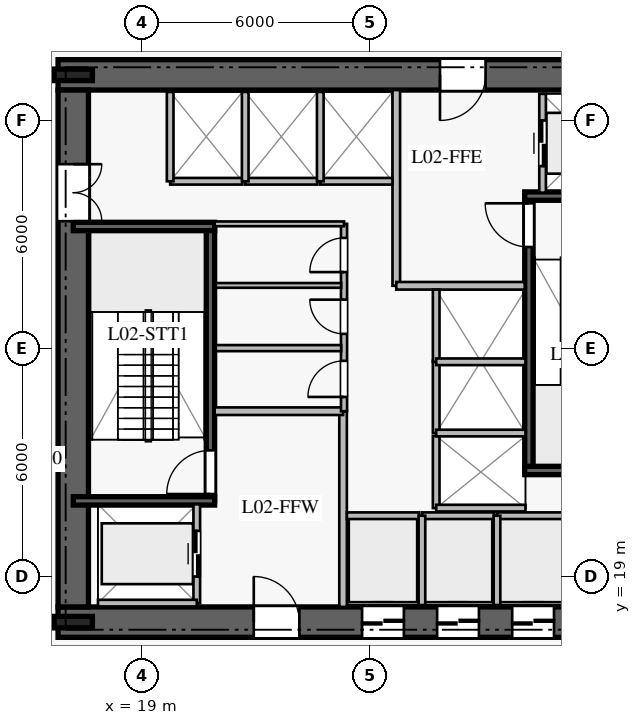
"""IFC4 building model, lengths in metres.
Left out: names, types, materials, properties, quantities, classifications, styles, units other than length and angle.
Written with IfcOpenShell. Run it as: python <this file> out.ifc"""

import sys

from ifc_helpers import new_model, si_unit, direction, frame, frame_2d, origin, origin_2d, place, context, subcontext, project, spatial, rectangle, i_section, extrude, element, fill, save


model = new_model("IFC4")
c1 = context("Model", 3, precision=1e-05, world=origin(), true_north=direction((0.0, 1.0)))
c2 = subcontext(c1, "Body", "Model", "MODEL_VIEW")
j1 = project(units=[si_unit("LENGTHUNIT", "METRE"), si_unit("PLANEANGLEUNIT", "RADIAN")], contexts=[c1])
p1 = place(None, origin())
s1 = spatial("IfcSite", under=j1, at=p1, CompositionType="ELEMENT")
p2 = place(p1, origin())
s2 = spatial("IfcBuilding", under=s1, at=p2, CompositionType="ELEMENT")
p3 = place(p2, frame((0.0, 0.0, 9.8)))
s3 = spatial("IfcBuildingStorey", under=s2, at=p3, CompositionType="ELEMENT", Elevation=9.8)
p4 = place(p3, frame((16.8, 17.8, 0.0), z_axis=(0.0, 0.0, 1.0), x_axis=(1.0, 0.0, 0.0)))
e1 = element("IfcWall", 1, at=p4, inside=s3, PredefinedType="SHEAR", context=c2, shape_type="SweptSolid", body=[
    extrude(rectangle(XDim=16.4, YDim=0.8, at=frame_2d((8.2, 0.0))), origin(), (0.0, 0.0, 1.0), 4.34),
])
p5 = place(p4, frame((5.15, 0.0, 0.0)))
e2 = element("IfcOpeningElement", 2, at=p5, cuts=e1, PredefinedType="OPENING", context=c2, shape_type="SweptSolid", body=[
    extrude(rectangle(XDim=1.2, YDim=2.25, at=frame_2d((0.6, 1.125))), frame((0.0, 0.41, 0.0), z_axis=(0.0, -1.0, 0.0), x_axis=(1.0, 0.0, 0.0)), (0.0, 0.0, 1.0), 0.82),
])
p6 = place(p4, frame((14.1, 0.0, 0.0)))
e3 = element("IfcOpeningElement", 3, at=p6, cuts=e1, PredefinedType="OPENING", context=c2, shape_type="SweptSolid", body=[
    extrude(rectangle(XDim=0.9, YDim=2.1, at=frame_2d((0.45, 1.05))), frame((0.0, 0.41, 0.0), z_axis=(0.0, -1.0, 0.0), x_axis=(1.0, 0.0, 0.0)), (0.0, 0.0, 1.0), 0.82),
])
p7 = place(p4, frame((8.0, 0.0, 0.0)))
e4 = element("IfcOpeningElement", 4, at=p7, cuts=e1, PredefinedType="OPENING", context=c2, shape_type="SweptSolid", body=[
    extrude(rectangle(XDim=1.1, YDim=2.2, at=frame_2d((0.55, 1.1))), frame((0.0, 0.41, 0.0), z_axis=(0.0, -1.0, 0.0), x_axis=(1.0, 0.0, 0.0)), (0.0, 0.0, 1.0), 0.82),
])
p8 = place(p4, frame((9.975, 0.0, 0.0)))
e5 = element("IfcOpeningElement", 5, at=p8, cuts=e1, PredefinedType="OPENING", context=c2, shape_type="SweptSolid", body=[
    extrude(rectangle(XDim=1.1, YDim=2.2, at=frame_2d((0.55, 1.1))), frame((0.0, 0.41, 0.0), z_axis=(0.0, -1.0, 0.0), x_axis=(1.0, 0.0, 0.0)), (0.0, 0.0, 1.0), 0.82),
])
p9 = place(p4, frame((11.95, 0.0, 0.0)))
e6 = element("IfcOpeningElement", 6, at=p9, cuts=e1, PredefinedType="OPENING", context=c2, shape_type="SweptSolid", body=[
    extrude(rectangle(XDim=1.1, YDim=2.2, at=frame_2d((0.55, 1.1))), frame((0.0, 0.41, 0.0), z_axis=(0.0, -1.0, 0.0), x_axis=(1.0, 0.0, 0.0)), (0.0, 0.0, 1.0), 0.82),
])
p10 = place(p3, frame((33.2, 32.2, 0.0), z_axis=(0.0, 0.0, 1.0), x_axis=(-1.0, 0.0, 0.0)))
e7 = element("IfcWall", 7, at=p10, inside=s3, PredefinedType="SHEAR", context=c2, shape_type="SweptSolid", body=[
    extrude(rectangle(XDim=16.4, YDim=0.8, at=frame_2d((8.2, 0.0))), origin(), (0.0, 0.0, 1.0), 4.34),
])
p11 = place(p10, frame((5.15, 0.0, 0.0)))
e8 = element("IfcOpeningElement", 8, at=p11, cuts=e7, PredefinedType="OPENING", context=c2, shape_type="SweptSolid", body=[
    extrude(rectangle(XDim=1.2, YDim=2.25, at=frame_2d((0.6, 1.125))), frame((0.0, 0.41, 0.0), z_axis=(0.0, -1.0, 0.0), x_axis=(1.0, 0.0, 0.0)), (0.0, 0.0, 1.0), 0.82),
])
p12 = place(p3, frame((17.2, 31.8, 0.0), z_axis=(0.0, 0.0, 1.0), x_axis=(0.0, -1.0, 0.0)))
e9 = element("IfcWall", 9, at=p12, inside=s3, PredefinedType="SHEAR", context=c2, shape_type="SweptSolid", body=[
    extrude(rectangle(XDim=13.6, YDim=0.8, at=frame_2d((6.8, 0.0))), origin(), (0.0, 0.0, 1.0), 4.34),
])
p13 = place(p12, frame((1.95, 0.0, 0.0)))
e10 = element("IfcOpeningElement", 10, at=p13, cuts=e9, PredefinedType="OPENING", context=c2, shape_type="SweptSolid", body=[
    extrude(rectangle(XDim=1.5, YDim=2.2, at=frame_2d((0.75, 1.1))), frame((0.0, 0.41, 0.0), z_axis=(0.0, -1.0, 0.0), x_axis=(1.0, 0.0, 0.0)), (0.0, 0.0, 1.0), 0.82),
])
for number, where, z_axis, x_axis in (
    (11, (17.2, 17.8, 0.0), (0.0, 0.0, 1.0), (1.0, 0.0, 0.0)),
    (12, (17.2, 32.2, 0.0), (0.0, 0.0, 1.0), (1.0, 0.0, 0.0)),
):
    element("IfcColumn", number, at=place(p3, frame(where, z_axis=z_axis, x_axis=x_axis)), inside=s3, PredefinedType="COLUMN", context=c2, shape_type="SweptSolid", body=[
        extrude(i_section(OverallWidth=0.302, OverallDepth=1.008, WebThickness=0.021, FlangeThickness=0.04, at=origin_2d()), origin(), (0.0, 0.0, 1.0), 4.6),
    ])
p14 = place(p3, frame((20.81, 20.99, 0.0), z_axis=(0.0, 0.0, 1.0), x_axis=(0.0, 1.0, 0.0)))
e13 = element("IfcWall", 13, at=p14, inside=s3, PredefinedType="SOLIDWALL", context=c2, shape_type="SweptSolid", body=[
    extrude(rectangle(XDim=7.22, YDim=0.22, at=frame_2d((3.61, 0.0))), origin(), (0.0, 0.0, 1.0), 4.34),
])
p15 = place(p14, frame((0.18, 0.0, 0.0)))
e14 = element("IfcOpeningElement", 14, at=p15, cuts=e13, PredefinedType="OPENING", context=c2, shape_type="SweptSolid", body=[
    extrude(rectangle(XDim=1.15, YDim=2.2, at=frame_2d((0.575, 1.1))), frame((0.0, 0.12, 0.0), z_axis=(0.0, -1.0, 0.0), x_axis=(1.0, 0.0, 0.0)), (0.0, 0.0, 1.0), 0.24),
])
for number, where, z_axis, x_axis in (
    (15, (17.2, 20.99, 0.0), (0.0, 0.0, 1.0), (1.0, 0.0, 0.0)),
    (16, (17.2, 28.21, 0.0), (0.0, 0.0, 1.0), (1.0, 0.0, 0.0)),
):
    element("IfcWall", number, at=place(p3, frame(where, z_axis=z_axis, x_axis=x_axis)), inside=s3, PredefinedType="SOLIDWALL", context=c2, shape_type="SweptSolid", body=[
        extrude(rectangle(XDim=3.72, YDim=0.22, at=frame_2d((1.86, 0.0))), origin(), (0.0, 0.0, 1.0), 4.34),
    ])
p16 = place(p3, frame((29.19, 21.79, 0.0), z_axis=(0.0, 0.0, 1.0), x_axis=(0.0, 1.0, 0.0)))
e17 = element("IfcWall", 17, at=p16, inside=s3, PredefinedType="SOLIDWALL", context=c2, shape_type="SweptSolid", body=[
    extrude(rectangle(XDim=7.22, YDim=0.22, at=frame_2d((3.61, 0.0))), origin(), (0.0, 0.0, 1.0), 4.34),
])
p17 = place(p16, frame((5.88, 0.0, 0.0)))
e18 = element("IfcOpeningElement", 18, at=p17, cuts=e17, PredefinedType="OPENING", context=c2, shape_type="SweptSolid", body=[
    extrude(rectangle(XDim=1.15, YDim=2.2, at=frame_2d((0.575, 1.1))), frame((0.0, 0.12, 0.0), z_axis=(0.0, -1.0, 0.0), x_axis=(1.0, 0.0, 0.0)), (0.0, 0.0, 1.0), 0.24),
])
for number, where, z_axis, x_axis in (
    (19, (29.08, 21.79, 0.0), (0.0, 0.0, 1.0), (1.0, 0.0, 0.0)),
    (20, (29.08, 29.01, 0.0), (0.0, 0.0, 1.0), (1.0, 0.0, 0.0)),
):
    element("IfcWall", number, at=place(p3, frame(where, z_axis=z_axis, x_axis=x_axis)), inside=s3, PredefinedType="SOLIDWALL", context=c2, shape_type="SweptSolid", body=[
        extrude(rectangle(XDim=3.72, YDim=0.22, at=frame_2d((1.86, 0.0))), origin(), (0.0, 0.0, 1.0), 4.34),
    ])
p18 = place(p3, frame((24.3, 18.2, 0.0), z_axis=(0.0, 0.0, 1.0), x_axis=(0.0, 1.0, 0.0)))
e21 = element("IfcWall", 21, at=p18, inside=s3, PredefinedType="PARTITIONING", context=c2, shape_type="SweptSolid", body=[
    extrude(rectangle(XDim=5.15, YDim=0.2, at=frame_2d((2.575, 0.0))), origin(), (0.0, 0.0, 1.0), 4.34),
])
p19 = place(p3, frame((20.92, 23.35, 0.0), z_axis=(0.0, 0.0, 1.0), x_axis=(1.0, 0.0, 0.0)))
e22 = element("IfcWall", 22, at=p19, inside=s3, PredefinedType="PARTITIONING", context=c2, shape_type="SweptSolid", body=[
    extrude(rectangle(XDim=3.38, YDim=0.2, at=frame_2d((1.69, 0.0))), origin(), (0.0, 0.0, 1.0), 4.34),
])
p20 = place(p3, frame((25.7, 26.65, 0.0), z_axis=(0.0, 0.0, 1.0), x_axis=(0.0, 1.0, 0.0)))
e23 = element("IfcWall", 23, at=p20, inside=s3, PredefinedType="PARTITIONING", context=c2, shape_type="SweptSolid", body=[
    extrude(rectangle(XDim=5.15, YDim=0.2, at=frame_2d((2.575, 0.0))), origin(), (0.0, 0.0, 1.0), 4.34),
])
p21 = place(p3, frame((25.7, 26.65, 0.0), z_axis=(0.0, 0.0, 1.0), x_axis=(1.0, 0.0, 0.0)))
e24 = element("IfcWall", 24, at=p21, inside=s3, PredefinedType="PARTITIONING", context=c2, shape_type="SweptSolid", body=[
    extrude(rectangle(XDim=3.38, YDim=0.2, at=frame_2d((1.69, 0.0))), origin(), (0.0, 0.0, 1.0), 4.34),
])
p22 = place(p3, frame((24.325, 23.35, 0.0), z_axis=(0.0, 0.0, 1.0), x_axis=(0.0, 1.0, 0.0)))
e25 = element("IfcWall", 25, at=p22, inside=s3, PredefinedType="PLUMBINGWALL", context=c2, shape_type="SweptSolid", body=[
    extrude(rectangle(XDim=4.93, YDim=0.16, at=frame_2d((2.465, 0.0))), origin(), (0.0, 0.0, 1.0), 4.34),
])
p23 = place(p22, frame((0.375, 0.0, 0.0)))
e26 = element("IfcOpeningElement", 26, at=p23, cuts=e25, PredefinedType="OPENING", context=c2, shape_type="SweptSolid", body=[
    extrude(rectangle(XDim=0.95, YDim=2.1, at=frame_2d((0.475, 1.05))), frame((0.0, 0.09, 0.0), z_axis=(0.0, -1.0, 0.0), x_axis=(1.0, 0.0, 0.0)), (0.0, 0.0, 1.0), 0.18),
])
p24 = place(p22, frame((2.035, 0.0, 0.0)))
e27 = element("IfcOpeningElement", 27, at=p24, cuts=e25, PredefinedType="OPENING", context=c2, shape_type="SweptSolid", body=[
    extrude(rectangle(XDim=0.9, YDim=2.1, at=frame_2d((0.45, 1.05))), frame((0.0, 0.09, 0.0), z_axis=(0.0, -1.0, 0.0), x_axis=(1.0, 0.0, 0.0)), (0.0, 0.0, 1.0), 0.18),
])
p25 = place(p22, frame((3.66, 0.0, 0.0)))
e28 = element("IfcOpeningElement", 28, at=p25, cuts=e25, PredefinedType="OPENING", context=c2, shape_type="SweptSolid", body=[
    extrude(rectangle(XDim=0.9, YDim=2.1, at=frame_2d((0.45, 1.05))), frame((0.0, 0.09, 0.0), z_axis=(0.0, -1.0, 0.0), x_axis=(1.0, 0.0, 0.0)), (0.0, 0.0, 1.0), 0.18),
])
p26 = place(p3, frame((20.92, 28.28, 0.0), z_axis=(0.0, 0.0, 1.0), x_axis=(1.0, 0.0, 0.0)))
e29 = element("IfcWall", 29, at=p26, inside=s3, PredefinedType="PARTITIONING", context=c2, shape_type="SweptSolid", body=[
    extrude(rectangle(XDim=3.405, YDim=0.125, at=frame_2d((1.703, 0.0))), origin(), (0.0, 0.0, 1.0), 4.34),
])
p27 = place(p3, frame((20.95, 25.01, 0.0), z_axis=(0.0, 0.0, 1.0), x_axis=(1.0, 0.0, 0.0)))
e30 = element("IfcWall", 30, at=p27, inside=s3, PredefinedType="PLUMBINGWALL", context=c2, shape_type="SweptSolid", body=[
    extrude(rectangle(XDim=3.3, YDim=0.16, at=frame_2d((1.65, 0.0))), origin(), (0.0, 0.0, 1.0), 4.34),
])
p28 = place(p3, frame((20.95, 26.66, 0.0), z_axis=(0.0, 0.0, 1.0), x_axis=(1.0, 0.0, 0.0)))
e31 = element("IfcWall", 31, at=p28, inside=s3, PredefinedType="PARTITIONING", context=c2, shape_type="SweptSolid", body=[
    extrude(rectangle(XDim=3.3, YDim=0.125, at=frame_2d((1.65, 0.0))), origin(), (0.0, 0.0, 1.0), 4.34),
])
p29 = place(p3, frame((24.4, 20.6, 0.0), z_axis=(0.0, 0.0, 1.0), x_axis=(1.0, 0.0, 0.0)))
e32 = element("IfcWall", 32, at=p29, inside=s3, PredefinedType="PARTITIONING", context=c2, shape_type="SweptSolid", body=[
    extrude(rectangle(XDim=1.9, YDim=0.175, at=frame_2d((0.95, 0.0))), origin(), (0.0, 0.0, 1.0), 4.34),
])
p30 = place(p3, frame((26.375, 20.6, 0.0), z_axis=(0.0, 0.0, 1.0), x_axis=(1.0, 0.0, 0.0)))
e33 = element("IfcWall", 33, at=p30, inside=s3, PredefinedType="PARTITIONING", context=c2, shape_type="SweptSolid", body=[
    extrude(rectangle(XDim=1.9, YDim=0.175, at=frame_2d((0.95, 0.0))), origin(), (0.0, 0.0, 1.0), 4.34),
])
p31 = place(p3, frame((26.375, 18.25, 0.0), z_axis=(0.0, 0.0, 1.0), x_axis=(0.0, 1.0, 0.0)))
e34 = element("IfcWall", 34, at=p31, inside=s3, PredefinedType="PARTITIONING", context=c2, shape_type="SweptSolid", body=[
    extrude(rectangle(XDim=2.35, YDim=0.175, at=frame_2d((1.175, 0.0))), origin(), (0.0, 0.0, 1.0), 4.34),
])
p32 = place(p3, frame((28.35, 20.6, 0.0), z_axis=(0.0, 0.0, 1.0), x_axis=(1.0, 0.0, 0.0)))
e35 = element("IfcWall", 35, at=p32, inside=s3, PredefinedType="PARTITIONING", context=c2, shape_type="SweptSolid", body=[
    extrude(rectangle(XDim=1.9, YDim=0.175, at=frame_2d((0.95, 0.0))), origin(), (0.0, 0.0, 1.0), 4.34),
])
p33 = place(p3, frame((28.35, 18.25, 0.0), z_axis=(0.0, 0.0, 1.0), x_axis=(0.0, 1.0, 0.0)))
e36 = element("IfcWall", 36, at=p33, inside=s3, PredefinedType="PARTITIONING", context=c2, shape_type="SweptSolid", body=[
    extrude(rectangle(XDim=2.35, YDim=0.175, at=frame_2d((1.175, 0.0))), origin(), (0.0, 0.0, 1.0), 4.34),
])
p34 = place(p3, frame((19.75, 29.4, 0.0), z_axis=(0.0, 0.0, 1.0), x_axis=(1.0, 0.0, 0.0)))
e37 = element("IfcWall", 37, at=p34, inside=s3, PredefinedType="PARTITIONING", context=c2, shape_type="SweptSolid", body=[
    extrude(rectangle(XDim=1.9, YDim=0.175, at=frame_2d((0.95, 0.0))), origin(), (0.0, 0.0, 1.0), 4.34),
])
p35 = place(p3, frame((19.75, 29.4, 0.0), z_axis=(0.0, 0.0, 1.0), x_axis=(0.0, 1.0, 0.0)))
e38 = element("IfcWall", 38, at=p35, inside=s3, PredefinedType="PARTITIONING", context=c2, shape_type="SweptSolid", body=[
    extrude(rectangle(XDim=2.35, YDim=0.175, at=frame_2d((1.175, 0.0))), origin(), (0.0, 0.0, 1.0), 4.34),
])
p36 = place(p3, frame((21.725, 29.4, 0.0), z_axis=(0.0, 0.0, 1.0), x_axis=(1.0, 0.0, 0.0)))
e39 = element("IfcWall", 39, at=p36, inside=s3, PredefinedType="PARTITIONING", context=c2, shape_type="SweptSolid", body=[
    extrude(rectangle(XDim=1.9, YDim=0.175, at=frame_2d((0.95, 0.0))), origin(), (0.0, 0.0, 1.0), 4.34),
])
p37 = place(p3, frame((21.725, 29.4, 0.0), z_axis=(0.0, 0.0, 1.0), x_axis=(0.0, 1.0, 0.0)))
e40 = element("IfcWall", 40, at=p37, inside=s3, PredefinedType="PARTITIONING", context=c2, shape_type="SweptSolid", body=[
    extrude(rectangle(XDim=2.35, YDim=0.175, at=frame_2d((1.175, 0.0))), origin(), (0.0, 0.0, 1.0), 4.34),
])
p38 = place(p3, frame((23.7, 29.4, 0.0), z_axis=(0.0, 0.0, 1.0), x_axis=(1.0, 0.0, 0.0)))
e41 = element("IfcWall", 41, at=p38, inside=s3, PredefinedType="PARTITIONING", context=c2, shape_type="SweptSolid", body=[
    extrude(rectangle(XDim=1.9, YDim=0.175, at=frame_2d((0.95, 0.0))), origin(), (0.0, 0.0, 1.0), 4.34),
])
p39 = place(p3, frame((23.7, 29.4, 0.0), z_axis=(0.0, 0.0, 1.0), x_axis=(0.0, 1.0, 0.0)))
e42 = element("IfcWall", 42, at=p39, inside=s3, PredefinedType="PARTITIONING", context=c2, shape_type="SweptSolid", body=[
    extrude(rectangle(XDim=2.35, YDim=0.175, at=frame_2d((1.175, 0.0))), origin(), (0.0, 0.0, 1.0), 4.34),
])
p40 = place(p3, frame((26.75, 20.8, 0.0), z_axis=(0.0, 0.0, 1.0), x_axis=(0.0, 1.0, 0.0)))
e43 = element("IfcWall", 43, at=p40, inside=s3, PredefinedType="PARTITIONING", context=c2, shape_type="SweptSolid", body=[
    extrude(rectangle(XDim=1.9, YDim=0.175, at=frame_2d((0.95, 0.0))), origin(), (0.0, 0.0, 1.0), 4.34),
])
p41 = place(p3, frame((26.75, 20.8, 0.0), z_axis=(0.0, 0.0, 1.0), x_axis=(1.0, 0.0, 0.0)))
e44 = element("IfcWall", 44, at=p41, inside=s3, PredefinedType="PARTITIONING", context=c2, shape_type="SweptSolid", body=[
    extrude(rectangle(XDim=2.35, YDim=0.175, at=frame_2d((1.175, 0.0))), origin(), (0.0, 0.0, 1.0), 4.34),
])
p42 = place(p3, frame((26.75, 22.775, 0.0), z_axis=(0.0, 0.0, 1.0), x_axis=(0.0, 1.0, 0.0)))
e45 = element("IfcWall", 45, at=p42, inside=s3, PredefinedType="PARTITIONING", context=c2, shape_type="SweptSolid", body=[
    extrude(rectangle(XDim=1.9, YDim=0.175, at=frame_2d((0.95, 0.0))), origin(), (0.0, 0.0, 1.0), 4.34),
])
p43 = place(p3, frame((26.75, 22.775, 0.0), z_axis=(0.0, 0.0, 1.0), x_axis=(1.0, 0.0, 0.0)))
e46 = element("IfcWall", 46, at=p43, inside=s3, PredefinedType="PARTITIONING", context=c2, shape_type="SweptSolid", body=[
    extrude(rectangle(XDim=2.35, YDim=0.175, at=frame_2d((1.175, 0.0))), origin(), (0.0, 0.0, 1.0), 4.34),
])
p44 = place(p3, frame((26.75, 24.65, 0.0), z_axis=(0.0, 0.0, 1.0), x_axis=(0.0, 1.0, 0.0)))
e47 = element("IfcWall", 47, at=p44, inside=s3, PredefinedType="PARTITIONING", context=c2, shape_type="SweptSolid", body=[
    extrude(rectangle(XDim=1.9, YDim=0.175, at=frame_2d((0.95, 0.0))), origin(), (0.0, 0.0, 1.0), 4.34),
])
p45 = place(p3, frame((26.75, 24.65, 0.0), z_axis=(0.0, 0.0, 1.0), x_axis=(1.0, 0.0, 0.0)))
e48 = element("IfcWall", 48, at=p45, inside=s3, PredefinedType="PARTITIONING", context=c2, shape_type="SweptSolid", body=[
    extrude(rectangle(XDim=2.35, YDim=0.175, at=frame_2d((1.175, 0.0))), origin(), (0.0, 0.0, 1.0), 4.34),
])
p46 = place(p3, frame((20.45, 18.3, 0.0), z_axis=(0.0, 0.0, 1.0), x_axis=(0.0, 1.0, 0.0)))
e49 = element("IfcWall", 49, at=p46, inside=s3, PredefinedType="PARTITIONING", context=c2, shape_type="SweptSolid", body=[
    extrude(rectangle(XDim=2.6, YDim=0.175, at=frame_2d((1.3, 0.0))), origin(), (0.0, 0.0, 1.0), 4.34),
])
p47 = place(p46, frame((0.7, 0.0, 0.0)))
e50 = element("IfcOpeningElement", 50, at=p47, cuts=e49, PredefinedType="OPENING", context=c2, shape_type="SweptSolid", body=[
    extrude(rectangle(XDim=1.2, YDim=2.2, at=frame_2d((0.6, 1.1))), frame((0.0, 0.098, 0.0), z_axis=(0.0, -1.0, 0.0), x_axis=(1.0, 0.0, 0.0)), (0.0, 0.0, 1.0), 0.195),
])
p48 = place(p3, frame((17.85, 18.3, 0.0), z_axis=(0.0, 0.0, 1.0), x_axis=(1.0, 0.0, 0.0)))
e51 = element("IfcWall", 51, at=p48, inside=s3, PredefinedType="PARTITIONING", context=c2, shape_type="SweptSolid", body=[
    extrude(rectangle(XDim=2.6, YDim=0.175, at=frame_2d((1.3, 0.0))), origin(), (0.0, 0.0, 1.0), 4.34),
])
p49 = place(p3, frame((29.55, 29.1, 0.0), z_axis=(0.0, 0.0, 1.0), x_axis=(0.0, 1.0, 0.0)))
e52 = element("IfcWall", 52, at=p49, inside=s3, PredefinedType="PARTITIONING", context=c2, shape_type="SweptSolid", body=[
    extrude(rectangle(XDim=2.6, YDim=0.175, at=frame_2d((1.3, 0.0))), origin(), (0.0, 0.0, 1.0), 4.34),
])
p50 = place(p49, frame((0.7, 0.0, 0.0)))
e53 = element("IfcOpeningElement", 53, at=p50, cuts=e52, PredefinedType="OPENING", context=c2, shape_type="SweptSolid", body=[
    extrude(rectangle(XDim=1.2, YDim=2.2, at=frame_2d((0.6, 1.1))), frame((0.0, 0.098, 0.0), z_axis=(0.0, -1.0, 0.0), x_axis=(1.0, 0.0, 0.0)), (0.0, 0.0, 1.0), 0.195),
])
p51 = place(p15, origin())
e54 = element("IfcDoor", 54, at=p51, inside=s3, OperationType="SINGLE_SWING_LEFT", PredefinedType="DOOR", context=c2, shape_type="SweptSolid", body=[
    extrude(rectangle(XDim=1.15, YDim=2.2, at=frame_2d((0.575, 1.1))), frame((0.0, 0.025, 0.0), z_axis=(0.0, -1.0, 0.0), x_axis=(1.0, 0.0, 0.0)), (0.0, 0.0, 1.0), 0.05),
])
fill(e14, e54)
p52 = place(p17, origin())
e55 = element("IfcDoor", 55, at=p52, inside=s3, OperationType="SINGLE_SWING_RIGHT", PredefinedType="DOOR", context=c2, shape_type="SweptSolid", body=[
    extrude(rectangle(XDim=1.15, YDim=2.2, at=frame_2d((0.575, 1.1))), frame((0.0, 0.025, 0.0), z_axis=(0.0, -1.0, 0.0), x_axis=(1.0, 0.0, 0.0)), (0.0, 0.0, 1.0), 0.05),
])
fill(e18, e55)
p53 = place(p5, origin())
e56 = element("IfcDoor", 56, at=p53, inside=s3, OperationType="SINGLE_SWING_LEFT", PredefinedType="DOOR", context=c2, shape_type="SweptSolid", body=[
    extrude(rectangle(XDim=1.2, YDim=2.25, at=frame_2d((0.6, 1.125))), frame((0.0, 0.025, 0.0), z_axis=(0.0, -1.0, 0.0), x_axis=(1.0, 0.0, 0.0)), (0.0, 0.0, 1.0), 0.05),
])
fill(e2, e56)
p54 = place(p11, origin())
e57 = element("IfcDoor", 57, at=p54, inside=s3, OperationType="SINGLE_SWING_RIGHT", PredefinedType="DOOR", context=c2, shape_type="SweptSolid", body=[
    extrude(rectangle(XDim=1.2, YDim=2.25, at=frame_2d((0.6, 1.125))), frame((0.0, 0.025, 0.0), z_axis=(0.0, -1.0, 0.0), x_axis=(1.0, 0.0, 0.0)), (0.0, 0.0, 1.0), 0.05),
])
fill(e8, e57)
p55 = place(p13, origin())
e58 = element("IfcDoor", 58, at=p55, inside=s3, OperationType="DOUBLE_DOOR_SINGLE_SWING", PredefinedType="DOOR", context=c2, shape_type="SweptSolid", body=[
    extrude(rectangle(XDim=1.5, YDim=2.2, at=frame_2d((0.75, 1.1))), frame((0.0, 0.025, 0.0), z_axis=(0.0, -1.0, 0.0), x_axis=(1.0, 0.0, 0.0)), (0.0, 0.0, 1.0), 0.05),
])
fill(e10, e58)
p56 = place(p23, origin())
e59 = element("IfcDoor", 59, at=p56, inside=s3, OperationType="SINGLE_SWING_LEFT", PredefinedType="DOOR", context=c2, shape_type="SweptSolid", body=[
    extrude(rectangle(XDim=0.95, YDim=2.1, at=frame_2d((0.475, 1.05))), frame((0.0, 0.025, 0.0), z_axis=(0.0, -1.0, 0.0), x_axis=(1.0, 0.0, 0.0)), (0.0, 0.0, 1.0), 0.05),
])
fill(e26, e59)
p57 = place(p24, origin())
e60 = element("IfcDoor", 60, at=p57, inside=s3, OperationType="SINGLE_SWING_RIGHT", PredefinedType="DOOR", context=c2, shape_type="SweptSolid", body=[
    extrude(rectangle(XDim=0.9, YDim=2.1, at=frame_2d((0.45, 1.05))), frame((0.0, 0.025, 0.0), z_axis=(0.0, -1.0, 0.0), x_axis=(1.0, 0.0, 0.0)), (0.0, 0.0, 1.0), 0.05),
])
fill(e27, e60)
p58 = place(p25, origin())
e61 = element("IfcDoor", 61, at=p58, inside=s3, OperationType="SINGLE_SWING_LEFT", PredefinedType="DOOR", context=c2, shape_type="SweptSolid", body=[
    extrude(rectangle(XDim=0.9, YDim=2.1, at=frame_2d((0.45, 1.05))), frame((0.0, 0.025, 0.0), z_axis=(0.0, -1.0, 0.0), x_axis=(1.0, 0.0, 0.0)), (0.0, 0.0, 1.0), 0.05),
])
fill(e28, e61)
p59 = place(p7, origin())
e62 = element("IfcDoor", 62, at=p59, inside=s3, OperationType="DOUBLE_DOOR_SLIDING", PredefinedType="DOOR", context=c2, shape_type="SweptSolid", body=[
    extrude(rectangle(XDim=1.1, YDim=2.2, at=frame_2d((0.55, 1.1))), frame((0.0, 0.025, 0.0), z_axis=(0.0, -1.0, 0.0), x_axis=(1.0, 0.0, 0.0)), (0.0, 0.0, 1.0), 0.05),
])
fill(e4, e62)
p60 = place(p8, origin())
e63 = element("IfcDoor", 63, at=p60, inside=s3, OperationType="DOUBLE_DOOR_SLIDING", PredefinedType="DOOR", context=c2, shape_type="SweptSolid", body=[
    extrude(rectangle(XDim=1.1, YDim=2.2, at=frame_2d((0.55, 1.1))), frame((0.0, 0.025, 0.0), z_axis=(0.0, -1.0, 0.0), x_axis=(1.0, 0.0, 0.0)), (0.0, 0.0, 1.0), 0.05),
])
fill(e5, e63)
p61 = place(p9, origin())
e64 = element("IfcDoor", 64, at=p61, inside=s3, OperationType="DOUBLE_DOOR_SLIDING", PredefinedType="DOOR", context=c2, shape_type="SweptSolid", body=[
    extrude(rectangle(XDim=1.1, YDim=2.2, at=frame_2d((0.55, 1.1))), frame((0.0, 0.025, 0.0), z_axis=(0.0, -1.0, 0.0), x_axis=(1.0, 0.0, 0.0)), (0.0, 0.0, 1.0), 0.05),
])
fill(e6, e64)
p62 = place(p47, origin())
e65 = element("IfcDoor", 65, at=p62, inside=s3, OperationType="DOUBLE_DOOR_SLIDING", PredefinedType="DOOR", context=c2, shape_type="SweptSolid", body=[
    extrude(rectangle(XDim=1.2, YDim=2.2, at=frame_2d((0.6, 1.1))), frame((0.0, 0.025, 0.0), z_axis=(0.0, -1.0, 0.0), x_axis=(1.0, 0.0, 0.0)), (0.0, 0.0, 1.0), 0.05),
])
fill(e50, e65)
p63 = place(p50, origin())
e66 = element("IfcDoor", 66, at=p63, inside=s3, OperationType="DOUBLE_DOOR_SLIDING", PredefinedType="DOOR", context=c2, shape_type="SweptSolid", body=[
    extrude(rectangle(XDim=1.2, YDim=2.2, at=frame_2d((0.6, 1.1))), frame((0.0, 0.025, 0.0), z_axis=(0.0, -1.0, 0.0), x_axis=(1.0, 0.0, 0.0)), (0.0, 0.0, 1.0), 0.05),
])
fill(e53, e66)
save(model, sys.argv[1])
